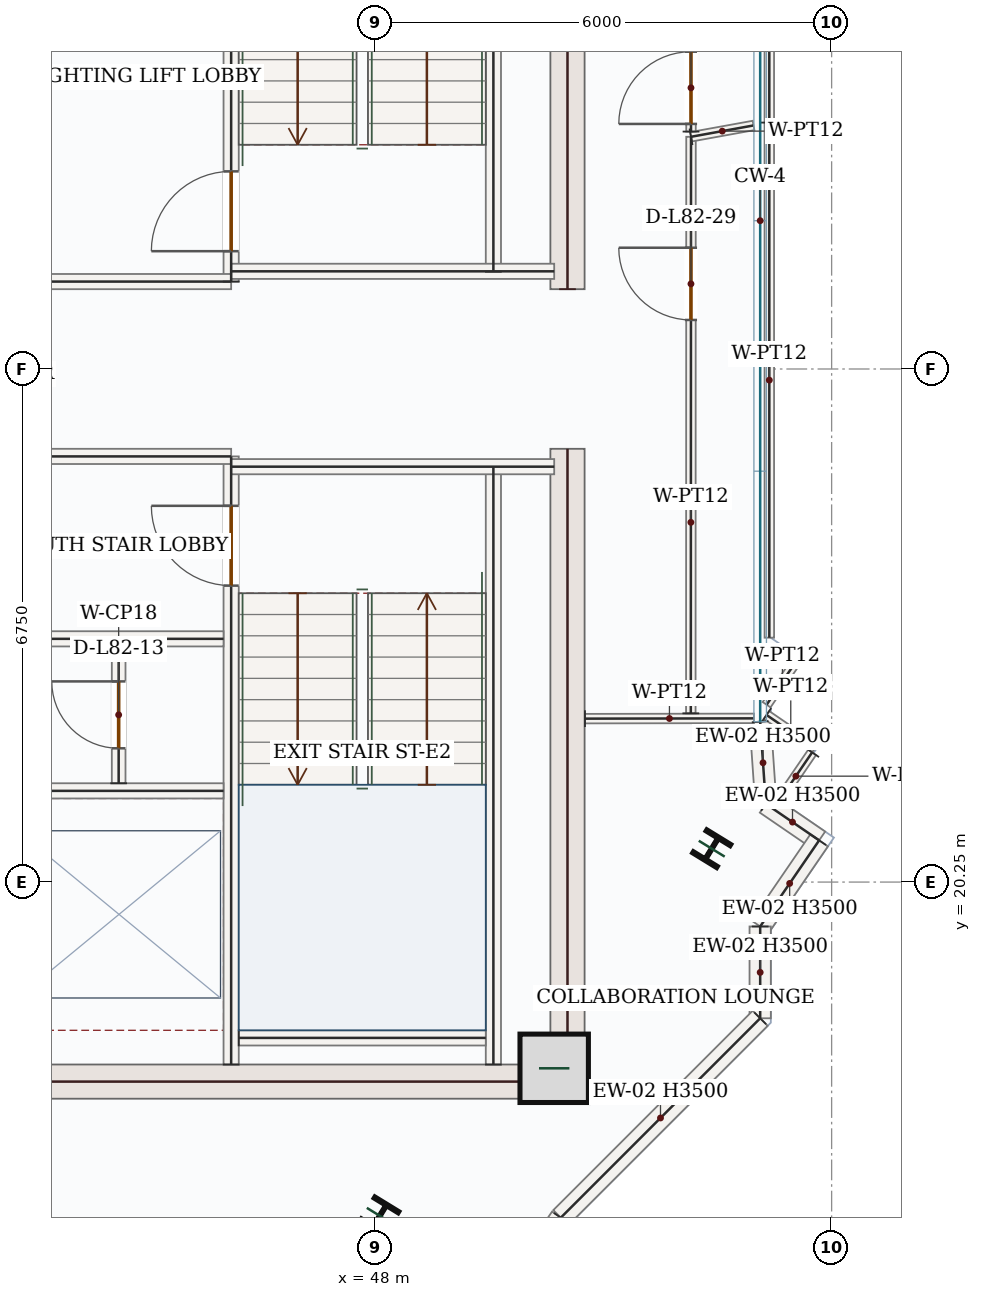
"""IFC4 building model, lengths in metres.
Left out: names, types, materials, properties, quantities, classifications, styles, units other than length and angle.
Written with IfcOpenShell. Run it as: python <this file> out.ifc"""

import sys

from ifc_helpers import new_model, si_unit, direction, frame, frame_2d, origin, origin_2d, place, context, subcontext, project, spatial, rectangle, i_section, extrude, source, transform, mapped, element, fill, save


model = new_model("IFC4")
c1 = context("Model", 3, precision=1e-05, world=origin(), true_north=direction((0.0, 1.0)))
c2 = subcontext(c1, "Body", "Model", "MODEL_VIEW")
j1 = project(units=[si_unit("LENGTHUNIT", "METRE"), si_unit("PLANEANGLEUNIT", "RADIAN")], contexts=[c1])
p1 = place(None, origin())
s1 = spatial("IfcSite", under=j1, at=p1, CompositionType="ELEMENT")
p2 = place(p1, origin())
s2 = spatial("IfcBuilding", under=s1, at=p2, CompositionType="ELEMENT")
p3 = place(p2, frame((0.0, 0.0, 338.55)))
s3 = spatial("IfcBuildingStorey", under=s2, at=p3, CompositionType="ELEMENT", Elevation=338.55)
m1 = source(origin(), c2, "Body", "SweptSolid", [
    extrude(rectangle(XDim=8.55, YDim=0.45, at=frame_2d((4.275, 0.0))), origin(), (0.0, 0.0, 1.0), 3.5),
])
for number, where, z_axis, x_axis in (
    (1, (50.525, 17.4, 0.0), (0.0, 0.0, 1.0), (0.0, 1.0, 0.0)),
    (2, (50.525, 28.05, 0.0), (0.0, 0.0, 1.0), (0.0, 1.0, 0.0)),
):
    element("IfcWall", number, at=place(p3, frame(where, z_axis=z_axis, x_axis=x_axis)), inside=s3, PredefinedType="SHEAR", context=c2, shape_type="MappedRepresentation", body=[
        mapped(m1, transform((0.0, 0.0, 0.0), x_axis=(1.0, 0.0, 0.0), y_axis=(0.0, 1.0, 0.0), z_axis=(0.0, 0.0, 1.0), scale=1.0)),
    ])
m2 = source(origin(), c2, "Body", "SweptSolid", [
    extrude(rectangle(XDim=7.1, YDim=0.45, at=frame_2d((3.55, 0.0))), origin(), (0.0, 0.0, 1.0), 3.5),
])
p4 = place(p3, frame((43.2, 17.625, 0.0), z_axis=(0.0, 0.0, 1.0), x_axis=(1.0, 0.0, 0.0)))
e3 = element("IfcWall", 3, at=p4, inside=s3, PredefinedType="SHEAR", context=c2, shape_type="MappedRepresentation", body=[
    mapped(m2, transform((0.0, 0.0, 0.0), x_axis=(1.0, 0.0, 0.0), y_axis=(0.0, 1.0, 0.0), z_axis=(0.0, 0.0, 1.0), scale=1.0)),
])
m3 = source(origin(), c2, "Body", "SweptSolid", [
    extrude(rectangle(XDim=0.9, YDim=0.9, at=origin_2d()), origin(), (0.0, 0.0, 1.0), 3.75),
])
p5 = place(p3, frame((50.35, 17.8, 0.0), z_axis=(0.0, 0.0, 1.0), x_axis=(1.0, 0.0, 0.0)))
e4 = element("IfcColumn", 4, at=p5, inside=s3, PredefinedType="COLUMN", context=c2, shape_type="MappedRepresentation", body=[
    mapped(m3, transform((0.0, 0.0, 0.0), x_axis=(1.0, 0.0, 0.0), y_axis=(0.0, 1.0, 0.0), z_axis=(0.0, 0.0, 1.0), scale=1.0)),
])
m4 = source(origin(), c2, "Body", "SweptSolid", [
    extrude(i_section(OverallWidth=0.369, OverallDepth=0.356, WebThickness=0.011, FlangeThickness=0.018, FilletRadius=0.018, at=origin_2d()), origin(), (0.0, 0.0, 1.0), 3.75),
])
for number, where, z_axis, x_axis in (
    (5, (48.055, 15.859, 0.0), (0.0, 0.0, 1.0), (-0.853, 0.522, 0.0)),
    (6, (52.423, 20.689, 0.0), (0.0, 0.0, 1.0), (-0.853, 0.522, 0.0)),
):
    element("IfcColumn", number, at=place(p3, frame(where, z_axis=z_axis, x_axis=x_axis)), inside=s3, PredefinedType="COLUMN", context=c2, shape_type="MappedRepresentation", body=[
        mapped(m4, transform((0.0, 0.0, 0.0), x_axis=(1.0, 0.0, 0.0), y_axis=(0.0, 1.0, 0.0), z_axis=(0.0, 0.0, 1.0), scale=1.0)),
    ])
m5 = source(origin(), c2, "Body", "SweptSolid", [
    extrude(rectangle(XDim=1.083, YDim=0.28, at=frame_2d((0.542, 0.0))), origin(), (0.0, 0.0, 1.0), 3.5),
])
p6 = place(p3, frame((53.06, 22.36, 0.0), z_axis=(0.0, 0.0, 1.0), x_axis=(0.068717036618, -0.997636190642, 0.0)))
e7 = element("IfcWall", 7, at=p6, inside=s3, PredefinedType="SOLIDWALL", context=c2, shape_type="MappedRepresentation", body=[
    mapped(m5, transform((0.0, 0.0, 0.0), x_axis=(1.0, 0.0, 0.0), y_axis=(0.0, 1.0, 0.0), z_axis=(0.0, 0.0, 1.0), scale=1.0)),
])
m6 = source(origin(), c2, "Body", "SweptSolid", [
    extrude(rectangle(XDim=0.85, YDim=0.28, at=frame_2d((0.425, 0.0))), origin(), (0.0, 0.0, 1.0), 3.5),
])
p7 = place(p3, frame((53.135, 21.279, 0.0), z_axis=(0.0, 0.0, 1.0), x_axis=(0.825046459993, -0.565064897913, 0.0)))
e8 = element("IfcWall", 8, at=p7, inside=s3, PredefinedType="SOLIDWALL", context=c2, shape_type="MappedRepresentation", body=[
    mapped(m6, transform((0.0, 0.0, 0.0), x_axis=(1.0, 0.0, 0.0), y_axis=(0.0, 1.0, 0.0), z_axis=(0.0, 0.0, 1.0), scale=1.0)),
])
m7 = source(origin(), c2, "Body", "SweptSolid", [
    extrude(rectangle(XDim=1.373, YDim=0.28, at=frame_2d((0.687, 0.0))), origin(), (0.0, 0.0, 1.0), 3.5),
])
p8 = place(p3, frame((53.836, 20.799, 0.0), z_axis=(0.0, 0.0, 1.0), x_axis=(-0.564875120833, -0.825176404088, 0.0)))
e9 = element("IfcWall", 9, at=p8, inside=s3, PredefinedType="SOLIDWALL", context=c2, shape_type="MappedRepresentation", body=[
    mapped(m7, transform((0.0, 0.0, 0.0), x_axis=(1.0, 0.0, 0.0), y_axis=(0.0, 1.0, 0.0), z_axis=(0.0, 0.0, 1.0), scale=1.0)),
])
m8 = source(origin(), c2, "Body", "SweptSolid", [
    extrude(rectangle(XDim=1.208, YDim=0.28, at=frame_2d((0.604, 0.0))), origin(), (0.0, 0.0, 1.0), 3.5),
])
p9 = place(p3, frame((53.06, 19.666, 0.0), z_axis=(0.0, 0.0, 1.0), x_axis=(0.0, -1.0, 0.0)))
e10 = element("IfcWall", 10, at=p9, inside=s3, PredefinedType="SOLIDWALL", context=c2, shape_type="MappedRepresentation", body=[
    mapped(m8, transform((0.0, 0.0, 0.0), x_axis=(1.0, 0.0, 0.0), y_axis=(0.0, 1.0, 0.0), z_axis=(0.0, 0.0, 1.0), scale=1.0)),
])
m9 = source(origin(), c2, "Body", "SweptSolid", [
    extrude(rectangle(XDim=3.709, YDim=0.28, at=frame_2d((1.855, 0.0))), origin(), (0.0, 0.0, 1.0), 3.5),
])
p10 = place(p3, frame((53.06, 18.458, 0.0), z_axis=(0.0, 0.0, 1.0), x_axis=(-0.707106781187, -0.707106781187, 0.0)))
e11 = element("IfcWall", 11, at=p10, inside=s3, PredefinedType="SOLIDWALL", context=c2, shape_type="MappedRepresentation", body=[
    mapped(m9, transform((0.0, 0.0, 0.0), x_axis=(1.0, 0.0, 0.0), y_axis=(0.0, 1.0, 0.0), z_axis=(0.0, 0.0, 1.0), scale=1.0)),
])
p11 = place(p3, frame((50.437, 15.835, 0.0), z_axis=(0.0, 0.0, 1.0), x_axis=(-0.564961879511, -0.825117006672, 0.0)))
e12 = element("IfcWall", 12, at=p11, inside=s3, PredefinedType="SOLIDWALL", context=c2, shape_type="SweptSolid", body=[
    extrude(rectangle(XDim=3.904, YDim=0.28, at=frame_2d((1.952, 0.0))), origin(), (0.0, 0.0, 1.0), 3.5),
])
p12 = place(p11, frame((1.202, 0.0, 0.85)))
e13 = element("IfcOpeningElement", 13, at=p12, cuts=e12, PredefinedType="OPENING", context=c2, shape_type="SweptSolid", body=[
    extrude(rectangle(XDim=1.5, YDim=1.5, at=frame_2d((0.75, 0.75))), frame((0.0, 0.15, 0.0), z_axis=(0.0, -1.0, 0.0), x_axis=(1.0, 0.0, 0.0)), (0.0, 0.0, 1.0), 0.3),
])
m10 = source(origin(), c2, "Body", "SweptSolid", [
    extrude(rectangle(XDim=7.87, YDim=0.2, at=frame_2d((3.935, 0.0))), origin(), (0.0, 0.0, 1.0), 3.5),
])
for number, where, z_axis, x_axis in (
    (14, (49.55, 17.85, 0.0), (0.0, 0.0, 1.0), (0.0, 1.0, 0.0)),
    (15, (49.55, 28.28, 0.0), (0.0, 0.0, 1.0), (0.0, 1.0, 0.0)),
):
    element("IfcWall", number, at=place(p3, frame(where, z_axis=z_axis, x_axis=x_axis)), inside=s3, PredefinedType="SOLIDWALL", context=c2, shape_type="MappedRepresentation", body=[
        mapped(m10, transform((0.0, 0.0, 0.0), x_axis=(1.0, 0.0, 0.0), y_axis=(0.0, 1.0, 0.0), z_axis=(0.0, 0.0, 1.0), scale=1.0)),
    ])
p13 = place(p3, frame((46.1, 17.85, 0.0), z_axis=(0.0, 0.0, 1.0), x_axis=(0.0, 1.0, 0.0)))
e16 = element("IfcWall", 16, at=p13, inside=s3, PredefinedType="SOLIDWALL", context=c2, shape_type="SweptSolid", body=[
    extrude(rectangle(XDim=8.0, YDim=0.2, at=frame_2d((4.0, 0.0))), origin(), (0.0, 0.0, 1.0), 3.5),
])
p14 = place(p13, frame((6.3, 0.0, 0.0)))
e17 = element("IfcOpeningElement", 17, at=p14, cuts=e16, PredefinedType="OPENING", context=c2, shape_type="SweptSolid", body=[
    extrude(rectangle(XDim=1.05, YDim=2.15, at=frame_2d((0.525, 1.075))), frame((0.0, 0.11, 0.0), z_axis=(0.0, -1.0, 0.0), x_axis=(1.0, 0.0, 0.0)), (0.0, 0.0, 1.0), 0.22),
])
p15 = place(p3, frame((46.1, 28.15, 0.0), z_axis=(0.0, 0.0, 1.0), x_axis=(0.0, 1.0, 0.0)))
e18 = element("IfcWall", 18, at=p15, inside=s3, PredefinedType="SOLIDWALL", context=c2, shape_type="SweptSolid", body=[
    extrude(rectangle(XDim=8.0, YDim=0.2, at=frame_2d((4.0, 0.0))), origin(), (0.0, 0.0, 1.0), 3.5),
])
p16 = place(p15, frame((0.4, 0.0, 0.0)))
e19 = element("IfcOpeningElement", 19, at=p16, cuts=e18, PredefinedType="OPENING", context=c2, shape_type="SweptSolid", body=[
    extrude(rectangle(XDim=1.05, YDim=2.15, at=frame_2d((0.525, 1.075))), frame((0.0, 0.11, 0.0), z_axis=(0.0, -1.0, 0.0), x_axis=(1.0, 0.0, 0.0)), (0.0, 0.0, 1.0), 0.22),
])
m11 = source(origin(), c2, "Body", "SweptSolid", [
    extrude(rectangle(XDim=3.0, YDim=0.2, at=frame_2d((1.5, 0.0))), origin(), (0.0, 0.0, 1.0), 3.5),
])
p17 = place(p3, frame((43.1, 25.85, 0.0), z_axis=(0.0, 0.0, 1.0), x_axis=(1.0, 0.0, 0.0)))
e20 = element("IfcWall", 20, at=p17, inside=s3, PredefinedType="SOLIDWALL", context=c2, shape_type="MappedRepresentation", body=[
    mapped(m11, transform((0.0, 0.0, 0.0), x_axis=(1.0, 0.0, 0.0), y_axis=(0.0, 1.0, 0.0), z_axis=(0.0, 0.0, 1.0), scale=1.0)),
])
m12 = source(origin(), c2, "Body", "SweptSolid", [
    extrude(rectangle(XDim=4.25, YDim=0.2, at=frame_2d((2.125, 0.0))), origin(), (0.0, 0.0, 1.0), 3.5),
])
p18 = place(p3, frame((46.1, 25.715, 0.0), z_axis=(0.0, 0.0, 1.0), x_axis=(1.0, 0.0, 0.0)))
e21 = element("IfcWall", 21, at=p18, inside=s3, PredefinedType="SOLIDWALL", context=c2, shape_type="MappedRepresentation", body=[
    mapped(m12, transform((0.0, 0.0, 0.0), x_axis=(1.0, 0.0, 0.0), y_axis=(0.0, 1.0, 0.0), z_axis=(0.0, 0.0, 1.0), scale=1.0)),
])
p19 = place(p3, frame((43.1, 28.15, 0.0), z_axis=(0.0, 0.0, 1.0), x_axis=(1.0, 0.0, 0.0)))
e22 = element("IfcWall", 22, at=p19, inside=s3, PredefinedType="SOLIDWALL", context=c2, shape_type="MappedRepresentation", body=[
    mapped(m11, transform((0.0, 0.0, 0.0), x_axis=(1.0, 0.0, 0.0), y_axis=(0.0, 1.0, 0.0), z_axis=(0.0, 0.0, 1.0), scale=1.0)),
])
p20 = place(p3, frame((46.1, 28.285, 0.0), z_axis=(0.0, 0.0, 1.0), x_axis=(1.0, 0.0, 0.0)))
e23 = element("IfcWall", 23, at=p20, inside=s3, PredefinedType="SOLIDWALL", context=c2, shape_type="MappedRepresentation", body=[
    mapped(m12, transform((0.0, 0.0, 0.0), x_axis=(1.0, 0.0, 0.0), y_axis=(0.0, 1.0, 0.0), z_axis=(0.0, 0.0, 1.0), scale=1.0)),
])
m13 = source(origin(), c2, "Body", "SweptSolid", [
    extrude(rectangle(XDim=3.25, YDim=0.2, at=frame_2d((1.625, 0.0))), origin(), (0.0, 0.0, 1.0), 3.5),
])
p21 = place(p3, frame((46.2, 18.2, 0.0), z_axis=(0.0, 0.0, 1.0), x_axis=(1.0, 0.0, 0.0)))
e24 = element("IfcWall", 24, at=p21, inside=s3, PredefinedType="SOLIDWALL", context=c2, shape_type="MappedRepresentation", body=[
    mapped(m13, transform((0.0, 0.0, 0.0), x_axis=(1.0, 0.0, 0.0), y_axis=(0.0, 1.0, 0.0), z_axis=(0.0, 0.0, 1.0), scale=1.0)),
])
m14 = source(origin(), c2, "Body", "SweptSolid", [
    extrude(rectangle(XDim=2.75, YDim=0.2, at=frame_2d((1.375, 0.0))), origin(), (0.0, 0.0, 1.0), 3.5),
])
for number, where, z_axis, x_axis in (
    (25, (43.25, 23.45, 0.0), (0.0, 0.0, 1.0), (1.0, 0.0, 0.0)),
    (26, (43.25, 21.45, 0.0), (0.0, 0.0, 1.0), (1.0, 0.0, 0.0)),
):
    element("IfcWall", number, at=place(p3, frame(where, z_axis=z_axis, x_axis=x_axis)), inside=s3, PredefinedType="SOLIDWALL", context=c2, shape_type="MappedRepresentation", body=[
        mapped(m14, transform((0.0, 0.0, 0.0), x_axis=(1.0, 0.0, 0.0), y_axis=(0.0, 1.0, 0.0), z_axis=(0.0, 0.0, 1.0), scale=1.0)),
    ])
p22 = place(p3, frame((44.62, 21.55, 0.0), z_axis=(0.0, 0.0, 1.0), x_axis=(0.0, 1.0, 0.0)))
e27 = element("IfcWall", 27, at=p22, inside=s3, PredefinedType="PARTITIONING", context=c2, shape_type="SweptSolid", body=[
    extrude(rectangle(XDim=1.8, YDim=0.18, at=frame_2d((0.9, 0.0))), origin(), (0.0, 0.0, 1.0), 3.5),
])
p23 = place(p22, frame((0.46, 0.0, 0.0)))
e28 = element("IfcOpeningElement", 28, at=p23, cuts=e27, PredefinedType="OPENING", context=c2, shape_type="SweptSolid", body=[
    extrude(rectangle(XDim=0.88, YDim=2.1, at=frame_2d((0.44, 1.05))), frame((0.0, 0.1, 0.0), z_axis=(0.0, -1.0, 0.0), x_axis=(1.0, 0.0, 0.0)), (0.0, 0.0, 1.0), 0.2),
])
m15 = source(origin(), c2, "Body", "SweptSolid", [
    extrude(rectangle(XDim=2.223, YDim=0.125, at=frame_2d((1.111, 0.0))), origin(), (0.0, 0.0, 1.0), 3.5),
])
p24 = place(p3, frame((50.755, 22.4, 0.0), z_axis=(0.0, 0.0, 1.0), x_axis=(0.999998642665, 0.00164762518, 0.0)))
e29 = element("IfcWall", 29, at=p24, inside=s3, PredefinedType="PARTITIONING", context=c2, shape_type="MappedRepresentation", body=[
    mapped(m15, transform((0.0, 0.0, 0.0), x_axis=(1.0, 0.0, 0.0), y_axis=(0.0, 1.0, 0.0), z_axis=(0.0, 0.0, 1.0), scale=1.0)),
])
p25 = place(p3, frame((52.147, 22.47, 0.0), z_axis=(0.0, 0.0, 1.0), x_axis=(0.000321874581, 0.999999948198, 0.0)))
e30 = element("IfcWall", 30, at=p25, inside=s3, PredefinedType="PARTITIONING", context=c2, shape_type="SweptSolid", body=[
    extrude(rectangle(XDim=7.585, YDim=0.125, at=frame_2d((3.792, 0.0))), origin(), (0.0, 0.0, 1.0), 3.5),
])
p26 = place(p25, frame((5.175, 0.0, 0.0)))
e31 = element("IfcOpeningElement", 31, at=p26, cuts=e30, PredefinedType="OPENING", context=c2, shape_type="SweptSolid", body=[
    extrude(rectangle(XDim=0.95, YDim=2.15, at=frame_2d((0.475, 1.075))), frame((0.0, 0.073, 0.0), z_axis=(0.0, -1.0, 0.0), x_axis=(1.0, 0.0, 0.0)), (0.0, 0.0, 1.0), 0.145),
])
m16 = source(origin(), c2, "Body", "SweptSolid", [
    extrude(rectangle(XDim=0.836, YDim=0.125, at=frame_2d((0.418, 0.0))), origin(), (0.0, 0.0, 1.0), 3.5),
])
p27 = place(p3, frame((52.15, 30.055, 0.0), z_axis=(0.0, 0.0, 1.0), x_axis=(0.983949253333, 0.178448499195, 0.0)))
e32 = element("IfcWall", 32, at=p27, inside=s3, PredefinedType="PARTITIONING", context=c2, shape_type="MappedRepresentation", body=[
    mapped(m16, transform((0.0, 0.0, 0.0), x_axis=(1.0, 0.0, 0.0), y_axis=(0.0, 1.0, 0.0), z_axis=(0.0, 0.0, 1.0), scale=1.0)),
])
m17 = source(origin(), c2, "Body", "SweptSolid", [
    extrude(rectangle(XDim=6.777, YDim=0.125, at=frame_2d((3.388, 0.0))), origin(), (0.0, 0.0, 1.0), 3.5),
])
p28 = place(p3, frame((53.18, 30.242, 0.0), z_axis=(0.0, 0.0, 1.0), x_axis=(7.2053896e-05, -0.999999997404, 0.0)))
e33 = element("IfcWall", 33, at=p28, inside=s3, PredefinedType="PARTITIONING", context=c2, shape_type="MappedRepresentation", body=[
    mapped(m17, transform((0.0, 0.0, 0.0), x_axis=(1.0, 0.0, 0.0), y_axis=(0.0, 1.0, 0.0), z_axis=(0.0, 0.0, 1.0), scale=1.0)),
])
m18 = source(origin(), c2, "Body", "SweptSolid", [
    extrude(rectangle(XDim=0.738, YDim=0.125, at=frame_2d((0.369, 0.0))), origin(), (0.0, 0.0, 1.0), 3.5),
])
p29 = place(p3, frame((53.56, 23.193, 0.0), z_axis=(0.0, 0.0, 1.0), x_axis=(-0.563069892808, -0.826409278634, 0.0)))
e34 = element("IfcWall", 34, at=p29, inside=s3, PredefinedType="PARTITIONING", context=c2, shape_type="MappedRepresentation", body=[
    mapped(m18, transform((0.0, 0.0, 0.0), x_axis=(1.0, 0.0, 0.0), y_axis=(0.0, 1.0, 0.0), z_axis=(0.0, 0.0, 1.0), scale=1.0)),
])
m19 = source(origin(), c2, "Body", "SweptSolid", [
    extrude(rectangle(XDim=0.773, YDim=0.125, at=frame_2d((0.387, 0.0))), origin(), (0.0, 0.0, 1.0), 3.5),
])
p30 = place(p3, frame((53.143, 22.448, 0.0), z_axis=(0.0, 0.0, 1.0), x_axis=(0.825237562889, -0.56478576894, 0.0)))
e35 = element("IfcWall", 35, at=p30, inside=s3, PredefinedType="PARTITIONING", context=c2, shape_type="MappedRepresentation", body=[
    mapped(m19, transform((0.0, 0.0, 0.0), x_axis=(1.0, 0.0, 0.0), y_axis=(0.0, 1.0, 0.0), z_axis=(0.0, 0.0, 1.0), scale=1.0)),
])
m20 = source(origin(), c2, "Body", "SweptSolid", [
    extrude(rectangle(XDim=0.757, YDim=0.125, at=frame_2d((0.379, 0.0))), origin(), (0.0, 0.0, 1.0), 3.5),
])
p31 = place(p3, frame((53.743, 21.956, 0.0), z_axis=(0.0, 0.0, 1.0), x_axis=(-0.564406554972, -0.825496965896, 0.0)))
e36 = element("IfcWall", 36, at=p31, inside=s3, PredefinedType="PARTITIONING", context=c2, shape_type="MappedRepresentation", body=[
    mapped(m20, transform((0.0, 0.0, 0.0), x_axis=(1.0, 0.0, 0.0), y_axis=(0.0, 1.0, 0.0), z_axis=(0.0, 0.0, 1.0), scale=1.0)),
])
m21 = source(origin(), c2, "Body", "SweptSolid", [
    extrude(rectangle(XDim=5.35, YDim=0.125, at=frame_2d((2.675, 0.0))), origin(), (0.0, 0.0, 1.0), 3.5),
])
p32 = place(p3, frame((53.18, 35.592, 0.0), z_axis=(0.0, 0.0, 1.0), x_axis=(0.0, -1.0, 0.0)))
e37 = element("IfcWall", 37, at=p32, inside=s3, PredefinedType="PARTITIONING", context=c2, shape_type="MappedRepresentation", body=[
    mapped(m21, transform((0.0, 0.0, 0.0), x_axis=(1.0, 0.0, 0.0), y_axis=(0.0, 1.0, 0.0), z_axis=(0.0, 0.0, 1.0), scale=1.0)),
])
p33 = place(p3, frame((52.15, 30.124, 0.0), z_axis=(0.0, 0.0, 1.0), x_axis=(-0.000520201074, 0.999999864695, 0.0)))
e38 = element("IfcWall", 38, at=p33, inside=s3, PredefinedType="PARTITIONING", context=c2, shape_type="SweptSolid", body=[
    extrude(rectangle(XDim=1.408, YDim=0.125, at=frame_2d((0.704, 0.0))), origin(), (0.0, 0.0, 1.0), 3.5),
])
p34 = place(p33, frame((0.101, 0.0, 0.0)))
e39 = element("IfcOpeningElement", 39, at=p34, cuts=e38, PredefinedType="OPENING", context=c2, shape_type="SweptSolid", body=[
    extrude(rectangle(XDim=0.95, YDim=2.15, at=frame_2d((0.475, 1.075))), frame((0.0, 0.073, 0.0), z_axis=(0.0, -1.0, 0.0), x_axis=(1.0, 0.0, 0.0)), (0.0, 0.0, 1.0), 0.145),
])
m22 = source(origin(), c2, "Body", "SweptSolid", [
    extrude(rectangle(XDim=1.05, YDim=2.15, at=frame_2d((0.525, 1.075))), frame((0.0, 0.025, 0.0), z_axis=(0.0, -1.0, 0.0), x_axis=(1.0, 0.0, 0.0)), (0.0, 0.0, 1.0), 0.05),
])
p35 = place(p16, origin())
e40 = element("IfcDoor", 40, at=p35, inside=s3, OperationType="SINGLE_SWING_LEFT", PredefinedType="DOOR", context=c2, shape_type="MappedRepresentation", body=[
    mapped(m22, transform((0.0, 0.0, 0.0), x_axis=(1.0, 0.0, 0.0), y_axis=(0.0, 1.0, 0.0), z_axis=(0.0, 0.0, 1.0), scale=1.0)),
])
fill(e19, e40)
p36 = place(p14, origin())
e41 = element("IfcDoor", 41, at=p36, inside=s3, OperationType="SINGLE_SWING_RIGHT", PredefinedType="DOOR", context=c2, shape_type="MappedRepresentation", body=[
    mapped(m22, transform((0.0, 0.0, 0.0), x_axis=(1.0, 0.0, 0.0), y_axis=(0.0, 1.0, 0.0), z_axis=(0.0, 0.0, 1.0), scale=1.0)),
])
fill(e17, e41)
m23 = source(origin(), c2, "Body", "SweptSolid", [
    extrude(rectangle(XDim=0.88, YDim=2.1, at=frame_2d((0.44, 1.05))), frame((0.0, 0.025, 0.0), z_axis=(0.0, -1.0, 0.0), x_axis=(1.0, 0.0, 0.0)), (0.0, 0.0, 1.0), 0.05),
])
p37 = place(p23, origin())
e42 = element("IfcDoor", 42, at=p37, inside=s3, OperationType="SINGLE_SWING_RIGHT", PredefinedType="DOOR", context=c2, shape_type="MappedRepresentation", body=[
    mapped(m23, transform((0.0, 0.0, 0.0), x_axis=(1.0, 0.0, 0.0), y_axis=(0.0, 1.0, 0.0), z_axis=(0.0, 0.0, 1.0), scale=1.0)),
])
fill(e28, e42)
m24 = source(origin(), c2, "Body", "SweptSolid", [
    extrude(rectangle(XDim=0.95, YDim=2.15, at=frame_2d((0.475, 1.075))), frame((0.0, 0.025, 0.0), z_axis=(0.0, -1.0, 0.0), x_axis=(1.0, 0.0, 0.0)), (0.0, 0.0, 1.0), 0.05),
])
p38 = place(p34, origin())
e43 = element("IfcDoor", 43, at=p38, inside=s3, OperationType="SINGLE_SWING_LEFT", PredefinedType="DOOR", context=c2, shape_type="MappedRepresentation", body=[
    mapped(m24, transform((0.0, 0.0, 0.0), x_axis=(1.0, 0.0, 0.0), y_axis=(0.0, 1.0, 0.0), z_axis=(0.0, 0.0, 1.0), scale=1.0)),
])
fill(e39, e43)
p39 = place(p26, origin())
e44 = element("IfcDoor", 44, at=p39, inside=s3, OperationType="SINGLE_SWING_RIGHT", PredefinedType="DOOR", context=c2, shape_type="MappedRepresentation", body=[
    mapped(m24, transform((0.0, 0.0, 0.0), x_axis=(1.0, 0.0, 0.0), y_axis=(0.0, 1.0, 0.0), z_axis=(0.0, 0.0, 1.0), scale=1.0)),
])
fill(e31, e44)
save(model, sys.argv[1])
